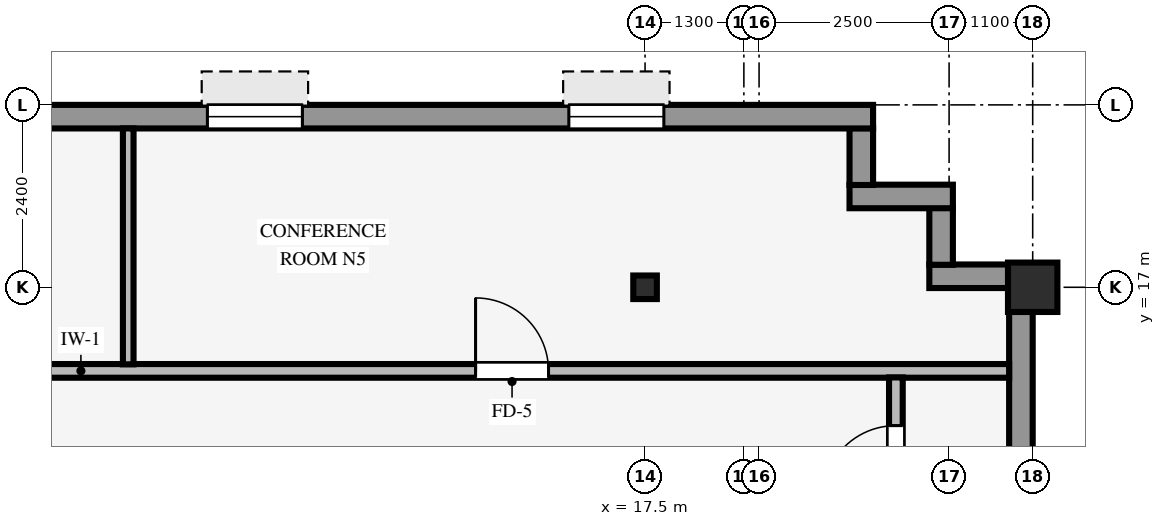
"""IFC4 building model, lengths in metres.
Left out: names, types, materials, properties, quantities, classifications, styles, units other than length and angle.
Written with IfcOpenShell. Run it as: python <this file> out.ifc"""

import sys

from ifc_helpers import new_model, si_unit, direction, frame, frame_2d, origin, origin_2d, place, context, subcontext, project, spatial, rectangle, hollow_rectangle, i_section, extrude, source, transform, mapped, element, fill, save


model = new_model("IFC4")
c1 = context("Model", 3, precision=1e-05, world=origin(), true_north=direction((0.0, 1.0)))
c2 = subcontext(c1, "Body", "Model", "MODEL_VIEW")
j1 = project(units=[si_unit("LENGTHUNIT", "METRE"), si_unit("PLANEANGLEUNIT", "RADIAN")], contexts=[c1])
p1 = place(None, origin())
s1 = spatial("IfcSite", under=j1, at=p1, CompositionType="ELEMENT")
p2 = place(p1, origin())
s2 = spatial("IfcBuilding", under=s1, at=p2, CompositionType="ELEMENT")
p3 = place(p2, frame((0.0, 0.0, 178.6)))
s3 = spatial("IfcBuildingStorey", under=s2, at=p3, CompositionType="ELEMENT", Elevation=178.6)
p4 = place(p3, frame((22.6, 17.0, 0.0), z_axis=(0.0, 0.0, 1.0), x_axis=(1.0, 0.0, 0.0)))
e1 = element("IfcColumn", 1, at=p4, inside=s3, PredefinedType="COLUMN", context=c2, shape_type="SweptSolid", body=[
    extrude(hollow_rectangle(XDim=0.65, YDim=0.65, WallThickness=0.04, InnerFilletRadius=0.04, OuterFilletRadius=0.08, at=origin_2d()), origin(), (0.0, 0.0, 1.0), 3.37),
])
p5 = place(p3, frame((17.5, 17.0, 0.0), z_axis=(0.0, 0.0, 1.0), x_axis=(1.0, 0.0, 0.0)))
e2 = element("IfcColumn", 2, at=p5, inside=s3, PredefinedType="COLUMN", context=c2, shape_type="SweptSolid", body=[
    extrude(i_section(OverallWidth=0.31, OverallDepth=0.31, WebThickness=0.015, FlangeThickness=0.015, FilletRadius=0.015, at=origin_2d()), origin(), (0.0, 0.0, 1.0), 3.37),
])
p6 = place(p3, frame((22.445, -20.794, 0.0), z_axis=(0.0, 0.0, 1.0), x_axis=(0.0, 1.0, 0.0)))
e3 = element("IfcWall", 3, at=p6, inside=s3, PredefinedType="STANDARD", context=c2, shape_type="SweptSolid", body=[
    extrude(rectangle(XDim=37.788, YDim=0.31, at=frame_2d((18.894, 0.0))), origin(), (0.0, 0.0, 1.0), 2.705),
])
p7 = place(p6, frame((16.444, 0.0, 0.0), z_axis=(0.0, 0.0, 1.0), x_axis=(-1.0, 0.0, 0.0)))
e4 = element("IfcOpeningElement", 4, at=p7, cuts=e3, PredefinedType="OPENING", context=c2, shape_type="SweptSolid", body=[
    extrude(rectangle(XDim=1.05, YDim=2.1, at=frame_2d((0.525, 1.05))), frame((0.0, 0.165, 0.0), z_axis=(0.0, -1.0, 0.0), x_axis=(1.0, 0.0, 0.0)), (0.0, 0.0, 1.0), 0.33),
])
p8 = place(p6, frame((7.644, 0.0, 0.8)))
e5 = element("IfcOpeningElement", 5, at=p8, cuts=e3, PredefinedType="OPENING", context=c2, shape_type="SweptSolid", body=[
    extrude(rectangle(XDim=2.05, YDim=1.52, at=frame_2d((1.025, 0.76))), frame((0.0, 0.165, 0.0), z_axis=(0.0, -1.0, 0.0), x_axis=(1.0, 0.0, 0.0)), (0.0, 0.0, 1.0), 0.33),
])
p9 = place(p6, frame((12.756, 0.0, 0.8)))
e6 = element("IfcOpeningElement", 6, at=p9, cuts=e3, PredefinedType="OPENING", context=c2, shape_type="SweptSolid", body=[
    extrude(rectangle(XDim=2.05, YDim=1.52, at=frame_2d((1.025, 0.76))), frame((0.0, 0.165, 0.0), z_axis=(0.0, -1.0, 0.0), x_axis=(1.0, 0.0, 0.0)), (0.0, 0.0, 1.0), 0.33),
])
p10 = place(p6, frame((17.869, 0.0, 0.8)))
e7 = element("IfcOpeningElement", 7, at=p10, cuts=e3, PredefinedType="OPENING", context=c2, shape_type="SweptSolid", body=[
    extrude(rectangle(XDim=2.05, YDim=1.52, at=frame_2d((1.025, 0.76))), frame((0.0, 0.165, 0.0), z_axis=(0.0, -1.0, 0.0), x_axis=(1.0, 0.0, 0.0)), (0.0, 0.0, 1.0), 0.33),
])
p11 = place(p6, frame((22.982, 0.0, 0.8)))
e8 = element("IfcOpeningElement", 8, at=p11, cuts=e3, PredefinedType="OPENING", context=c2, shape_type="SweptSolid", body=[
    extrude(rectangle(XDim=2.05, YDim=1.52, at=frame_2d((1.025, 0.76))), frame((0.0, 0.165, 0.0), z_axis=(0.0, -1.0, 0.0), x_axis=(1.0, 0.0, 0.0)), (0.0, 0.0, 1.0), 0.33),
])
p12 = place(p6, frame((27.194, 0.0, 0.8)))
e9 = element("IfcOpeningElement", 9, at=p12, cuts=e3, PredefinedType="OPENING", context=c2, shape_type="SweptSolid", body=[
    extrude(rectangle(XDim=2.05, YDim=1.52, at=frame_2d((1.025, 0.76))), frame((0.0, 0.165, 0.0), z_axis=(0.0, -1.0, 0.0), x_axis=(1.0, 0.0, 0.0)), (0.0, 0.0, 1.0), 0.33),
])
p13 = place(p6, frame((33.207, 0.0, 0.8)))
e10 = element("IfcOpeningElement", 10, at=p13, cuts=e3, PredefinedType="OPENING", context=c2, shape_type="SweptSolid", body=[
    extrude(rectangle(XDim=2.05, YDim=1.52, at=frame_2d((1.025, 0.76))), frame((0.0, 0.165, 0.0), z_axis=(0.0, -1.0, 0.0), x_axis=(1.0, 0.0, 0.0)), (0.0, 0.0, 1.0), 0.33),
])
p14 = place(p3, frame((21.24, 17.145, 0.0), z_axis=(0.0, 0.0, 1.0), x_axis=(1.0, 0.0, 0.0)))
e11 = element("IfcWall", 11, at=p14, inside=s3, PredefinedType="STANDARD", context=c2, shape_type="SweptSolid", body=[
    extrude(rectangle(XDim=1.36, YDim=0.31, at=frame_2d((0.68, 0.0))), origin(), (0.0, 0.0, 1.0), 2.816),
])
p15 = place(p3, frame((21.395, 17.296, 0.0), z_axis=(0.0, 0.0, 1.0), x_axis=(0.0, 1.0, 0.0)))
e12 = element("IfcWall", 12, at=p15, inside=s3, PredefinedType="STANDARD", context=c2, shape_type="SweptSolid", body=[
    extrude(rectangle(XDim=0.748, YDim=0.31, at=frame_2d((0.374, 0.0))), origin(), (0.0, 0.0, 1.0), 2.816),
])
p16 = place(p3, frame((20.19, 18.195, 0.0), z_axis=(0.0, 0.0, 1.0), x_axis=(1.0, 0.0, 0.0)))
e13 = element("IfcWall", 13, at=p16, inside=s3, PredefinedType="STANDARD", context=c2, shape_type="SweptSolid", body=[
    extrude(rectangle(XDim=1.36, YDim=0.31, at=frame_2d((0.68, 0.0))), origin(), (0.0, 0.0, 1.0), 2.816),
])
p17 = place(p3, frame((20.345, 18.346, 0.0), z_axis=(0.0, 0.0, 1.0), x_axis=(0.0, 1.0, 0.0)))
e14 = element("IfcWall", 14, at=p17, inside=s3, PredefinedType="STANDARD", context=c2, shape_type="SweptSolid", body=[
    extrude(rectangle(XDim=0.748, YDim=0.31, at=frame_2d((0.374, 0.0))), origin(), (0.0, 0.0, 1.0), 2.816),
])
p18 = place(p3, frame((-24.3, 19.245, 0.0), z_axis=(0.0, 0.0, 1.0), x_axis=(1.0, 0.0, 0.0)))
e15 = element("IfcWall", 15, at=p18, inside=s3, PredefinedType="STANDARD", context=c2, shape_type="SweptSolid", body=[
    extrude(rectangle(XDim=44.8, YDim=0.31, at=frame_2d((22.4, 0.0))), origin(), (0.0, 0.0, 1.0), 2.705),
])
p19 = place(p18, frame((2.753, 0.0, 0.8)))
e16 = element("IfcOpeningElement", 16, at=p19, cuts=e15, PredefinedType="OPENING", context=c2, shape_type="SweptSolid", body=[
    extrude(rectangle(XDim=1.25, YDim=1.52, at=frame_2d((0.625, 0.76))), frame((0.0, 0.165, 0.0), z_axis=(0.0, -1.0, 0.0), x_axis=(1.0, 0.0, 0.0)), (0.0, 0.0, 1.0), 0.33),
])
p20 = place(p18, frame((7.058, 0.0, 0.8)))
e17 = element("IfcOpeningElement", 17, at=p20, cuts=e15, PredefinedType="OPENING", context=c2, shape_type="SweptSolid", body=[
    extrude(rectangle(XDim=1.25, YDim=1.52, at=frame_2d((0.625, 0.76))), frame((0.0, 0.165, 0.0), z_axis=(0.0, -1.0, 0.0), x_axis=(1.0, 0.0, 0.0)), (0.0, 0.0, 1.0), 0.33),
])
p21 = place(p18, frame((12.264, 0.0, 0.8)))
e18 = element("IfcOpeningElement", 18, at=p21, cuts=e15, PredefinedType="OPENING", context=c2, shape_type="SweptSolid", body=[
    extrude(rectangle(XDim=1.25, YDim=1.52, at=frame_2d((0.625, 0.76))), frame((0.0, 0.165, 0.0), z_axis=(0.0, -1.0, 0.0), x_axis=(1.0, 0.0, 0.0)), (0.0, 0.0, 1.0), 0.33),
])
p22 = place(p18, frame((17.919, 0.0, 0.8)))
e19 = element("IfcOpeningElement", 19, at=p22, cuts=e15, PredefinedType="OPENING", context=c2, shape_type="SweptSolid", body=[
    extrude(rectangle(XDim=1.25, YDim=1.52, at=frame_2d((0.625, 0.76))), frame((0.0, 0.165, 0.0), z_axis=(0.0, -1.0, 0.0), x_axis=(1.0, 0.0, 0.0)), (0.0, 0.0, 1.0), 0.33),
])
p23 = place(p18, frame((21.775, 0.0, 0.8)))
e20 = element("IfcOpeningElement", 20, at=p23, cuts=e15, PredefinedType="OPENING", context=c2, shape_type="SweptSolid", body=[
    extrude(rectangle(XDim=1.25, YDim=1.52, at=frame_2d((0.625, 0.76))), frame((0.0, 0.165, 0.0), z_axis=(0.0, -1.0, 0.0), x_axis=(1.0, 0.0, 0.0)), (0.0, 0.0, 1.0), 0.33),
])
p24 = place(p18, frame((26.981, 0.0, 0.8)))
e21 = element("IfcOpeningElement", 21, at=p24, cuts=e15, PredefinedType="OPENING", context=c2, shape_type="SweptSolid", body=[
    extrude(rectangle(XDim=1.25, YDim=1.52, at=frame_2d((0.625, 0.76))), frame((0.0, 0.165, 0.0), z_axis=(0.0, -1.0, 0.0), x_axis=(1.0, 0.0, 0.0)), (0.0, 0.0, 1.0), 0.33),
])
p25 = place(p18, frame((31.286, 0.0, 0.8)))
e22 = element("IfcOpeningElement", 22, at=p25, cuts=e15, PredefinedType="OPENING", context=c2, shape_type="SweptSolid", body=[
    extrude(rectangle(XDim=1.25, YDim=1.52, at=frame_2d((0.625, 0.76))), frame((0.0, 0.165, 0.0), z_axis=(0.0, -1.0, 0.0), x_axis=(1.0, 0.0, 0.0)), (0.0, 0.0, 1.0), 0.33),
])
p26 = place(p18, frame((36.042, 0.0, 0.8)))
e23 = element("IfcOpeningElement", 23, at=p26, cuts=e15, PredefinedType="OPENING", context=c2, shape_type="SweptSolid", body=[
    extrude(rectangle(XDim=1.25, YDim=1.52, at=frame_2d((0.625, 0.76))), frame((0.0, 0.165, 0.0), z_axis=(0.0, -1.0, 0.0), x_axis=(1.0, 0.0, 0.0)), (0.0, 0.0, 1.0), 0.33),
])
p27 = place(p18, frame((40.797, 0.0, 0.8)))
e24 = element("IfcOpeningElement", 24, at=p27, cuts=e15, PredefinedType="OPENING", context=c2, shape_type="SweptSolid", body=[
    extrude(rectangle(XDim=1.25, YDim=1.52, at=frame_2d((0.625, 0.76))), frame((0.0, 0.165, 0.0), z_axis=(0.0, -1.0, 0.0), x_axis=(1.0, 0.0, 0.0)), (0.0, 0.0, 1.0), 0.33),
])
p28 = place(p3, frame((-26.09, 15.9, 0.0), z_axis=(0.0, 0.0, 1.0), x_axis=(1.0, 0.0, 0.0)))
e25 = element("IfcWall", 25, at=p28, inside=s3, PredefinedType="PARTITIONING", context=c2, shape_type="SweptSolid", body=[
    extrude(rectangle(XDim=48.38, YDim=0.18, at=frame_2d((24.19, 0.0))), origin(), (0.0, 0.0, 1.0), 3.36),
])
p29 = place(p28, frame((41.36, 0.0, 0.0)))
e26 = element("IfcOpeningElement", 26, at=p29, cuts=e25, PredefinedType="OPENING", context=c2, shape_type="SweptSolid", body=[
    extrude(rectangle(XDim=0.96, YDim=2.1, at=frame_2d((0.48, 1.05))), frame((0.0, 0.1, 0.0), z_axis=(0.0, -1.0, 0.0), x_axis=(1.0, 0.0, 0.0)), (0.0, 0.0, 1.0), 0.2),
])
p30 = place(p28, frame((23.35, 0.0, 0.0)))
e27 = element("IfcOpeningElement", 27, at=p30, cuts=e25, PredefinedType="OPENING", context=c2, shape_type="SweptSolid", body=[
    extrude(rectangle(XDim=0.96, YDim=2.1, at=frame_2d((0.48, 1.05))), frame((0.0, 0.1, 0.0), z_axis=(0.0, -1.0, 0.0), x_axis=(1.0, 0.0, 0.0)), (0.0, 0.0, 1.0), 0.2),
])
p31 = place(p28, frame((14.41, 0.0, 0.0)))
e28 = element("IfcOpeningElement", 28, at=p31, cuts=e25, PredefinedType="OPENING", context=c2, shape_type="SweptSolid", body=[
    extrude(rectangle(XDim=0.96, YDim=2.1, at=frame_2d((0.48, 1.05))), frame((0.0, 0.1, 0.0), z_axis=(0.0, -1.0, 0.0), x_axis=(1.0, 0.0, 0.0)), (0.0, 0.0, 1.0), 0.2),
])
p32 = place(p28, frame((30.015, 0.0, 0.0)))
e29 = element("IfcOpeningElement", 29, at=p32, cuts=e25, PredefinedType="OPENING", context=c2, shape_type="SweptSolid", body=[
    extrude(rectangle(XDim=0.96, YDim=2.1, at=frame_2d((0.48, 1.05))), frame((0.0, 0.1, 0.0), z_axis=(0.0, -1.0, 0.0), x_axis=(1.0, 0.0, 0.0)), (0.0, 0.0, 1.0), 0.2),
])
p33 = place(p28, frame((6.66, 0.0, 0.0)))
e30 = element("IfcOpeningElement", 30, at=p33, cuts=e25, PredefinedType="OPENING", context=c2, shape_type="SweptSolid", body=[
    extrude(rectangle(XDim=0.96, YDim=2.1, at=frame_2d((0.48, 1.05))), frame((0.0, 0.1, 0.0), z_axis=(0.0, -1.0, 0.0), x_axis=(1.0, 0.0, 0.0)), (0.0, 0.0, 1.0), 0.2),
])
p34 = place(p3, frame((10.7, 15.986, 0.0), z_axis=(0.0, 0.0, 1.0), x_axis=(0.0, 1.0, 0.0)))
e31 = element("IfcWall", 31, at=p34, inside=s3, PredefinedType="PARTITIONING", context=c2, shape_type="SweptSolid", body=[
    extrude(rectangle(XDim=3.104, YDim=0.14, at=frame_2d((1.552, 0.0))), origin(), (0.0, 0.0, 1.0), 3.36),
])
p35 = place(p3, frame((20.8, 13.586, 0.0), z_axis=(0.0, 0.0, 1.0), x_axis=(0.0, 1.0, 0.0)))
e32 = element("IfcWall", 32, at=p35, inside=s3, PredefinedType="PARTITIONING", context=c2, shape_type="SweptSolid", body=[
    extrude(rectangle(XDim=2.228, YDim=0.18, at=frame_2d((1.114, 0.0))), origin(), (0.0, 0.0, 1.0), 3.36),
])
p36 = place(p35, frame((0.634, 0.0, 0.0)))
e33 = element("IfcOpeningElement", 33, at=p36, cuts=e32, PredefinedType="OPENING", context=c2, shape_type="SweptSolid", body=[
    extrude(rectangle(XDim=0.96, YDim=2.1, at=frame_2d((0.48, 1.05))), frame((0.0, 0.1, 0.0), z_axis=(0.0, -1.0, 0.0), x_axis=(1.0, 0.0, 0.0)), (0.0, 0.0, 1.0), 0.2),
])
m1 = source(origin(), c2, "Body", "SweptSolid", [
    extrude(rectangle(XDim=1.25, YDim=1.52, at=frame_2d((0.625, 0.76))), frame((0.0, 0.03, 0.0), z_axis=(0.0, -1.0, 0.0), x_axis=(1.0, 0.0, 0.0)), (0.0, 0.0, 1.0), 0.06),
])
p37 = place(p26, origin())
e34 = element("IfcWindow", 34, at=p37, inside=s3, PartitioningType="SINGLE_PANEL", PredefinedType="WINDOW", context=c2, shape_type="MappedRepresentation", body=[
    mapped(m1, transform((0.0, 0.0, 0.0), scale=1.0)),
])
fill(e23, e34)
p38 = place(p27, origin())
e35 = element("IfcWindow", 35, at=p38, inside=s3, PartitioningType="SINGLE_PANEL", PredefinedType="WINDOW", context=c2, shape_type="MappedRepresentation", body=[
    mapped(m1, transform((0.0, 0.0, 0.0), scale=1.0)),
])
fill(e24, e35)
m2 = source(origin(), c2, "Body", "SweptSolid", [
    extrude(rectangle(XDim=0.96, YDim=2.1, at=frame_2d((0.48, 1.05))), frame((0.0, 0.025, 0.0), z_axis=(0.0, -1.0, 0.0), x_axis=(1.0, 0.0, 0.0)), (0.0, 0.0, 1.0), 0.05),
])
p39 = place(p29, origin())
e36 = element("IfcDoor", 36, at=p39, inside=s3, OperationType="SINGLE_SWING_LEFT", PredefinedType="DOOR", context=c2, shape_type="MappedRepresentation", body=[
    mapped(m2, transform((0.0, 0.0, 0.0), scale=1.0)),
])
fill(e26, e36)
p40 = place(p36, origin())
e37 = element("IfcDoor", 37, at=p40, inside=s3, OperationType="SINGLE_SWING_LEFT", PredefinedType="DOOR", context=c2, shape_type="MappedRepresentation", body=[
    mapped(m2, transform((0.0, 0.0, 0.0), scale=1.0)),
])
fill(e33, e37)
save(model, sys.argv[1])
